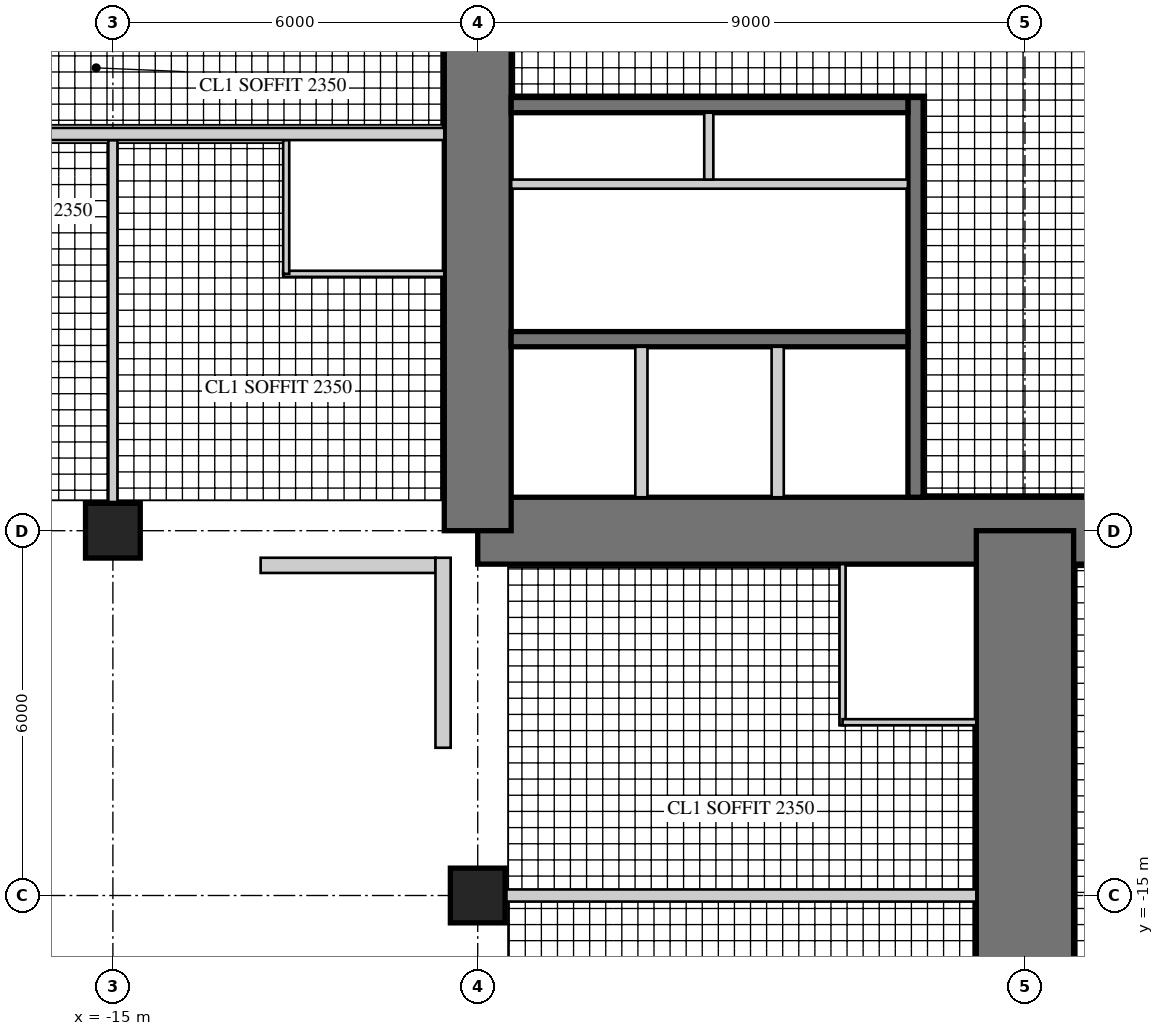
"""IFC4 building model, lengths in metres.
Left out: names, types, materials, properties, quantities, classifications, styles, units other than length and angle.
Written with IfcOpenShell. Run it as: python <this file> out.ifc"""

import sys

from ifc_helpers import new_model, si_unit, direction, frame, frame_2d, origin, origin_2d, place, context, subcontext, project, spatial, rectangle, hollow_rectangle, extrude, element, fill, save


model = new_model("IFC4")
c1 = context("Model", 3, precision=1e-05, world=origin(), true_north=direction((0.0, 1.0)))
c2 = subcontext(c1, "Body", "Model", "MODEL_VIEW")
j1 = project(units=[si_unit("LENGTHUNIT", "METRE"), si_unit("PLANEANGLEUNIT", "RADIAN")], contexts=[c1])
p1 = place(None, origin())
s1 = spatial("IfcSite", under=j1, at=p1, CompositionType="ELEMENT")
p2 = place(p1, origin())
s2 = spatial("IfcBuilding", under=s1, at=p2, CompositionType="ELEMENT")
p3 = place(p2, frame((0.0, 0.0, 200.1)))
s3 = spatial("IfcBuildingStorey", under=s2, at=p3, CompositionType="ELEMENT", Elevation=200.1)
p4 = place(p3, frame((-9.0, -9.0, 0.0), z_axis=(0.0, 0.0, 1.0), x_axis=(1.0, 0.0, 0.0)))
e1 = element("IfcWall", 1, at=p4, inside=s3, PredefinedType="SHEAR", context=c2, shape_type="SweptSolid", body=[
    extrude(rectangle(XDim=18.0, YDim=1.1, at=frame_2d((9.0, 0.0))), origin(), (0.0, 0.0, 1.0), 3.4),
])
p5 = place(p4, frame((9.8, 0.0, 0.0)))
e2 = element("IfcOpeningElement", 2, at=p5, cuts=e1, PredefinedType="OPENING", context=c2, shape_type="SweptSolid", body=[
    extrude(rectangle(XDim=1.0, YDim=2.4, at=frame_2d((0.5, 1.2))), frame((0.0, 0.56, 0.0), z_axis=(0.0, -1.0, 0.0), x_axis=(1.0, 0.0, 0.0)), (0.0, 0.0, 1.0), 1.12),
])
p6 = place(p3, frame((-9.0, 9.0, 0.0), z_axis=(0.0, 0.0, 1.0), x_axis=(0.0, -1.0, 0.0)))
e3 = element("IfcWall", 3, at=p6, inside=s3, PredefinedType="SHEAR", context=c2, shape_type="SweptSolid", body=[
    extrude(rectangle(XDim=18.0, YDim=1.1, at=frame_2d((9.0, 0.0))), origin(), (0.0, 0.0, 1.0), 3.4),
])
p7 = place(p6, frame((9.8, 0.0, 0.0)))
e4 = element("IfcOpeningElement", 4, at=p7, cuts=e3, PredefinedType="OPENING", context=c2, shape_type="SweptSolid", body=[
    extrude(rectangle(XDim=1.0, YDim=2.4, at=frame_2d((0.5, 1.2))), frame((0.0, 0.56, 0.0), z_axis=(0.0, -1.0, 0.0), x_axis=(1.0, 0.0, 0.0)), (0.0, 0.0, 1.0), 1.12),
])
p8 = place(p3, frame((-1.8, -1.875, 0.0), z_axis=(0.0, 0.0, 1.0), x_axis=(0.0, -1.0, 0.0)))
e5 = element("IfcWall", 5, at=p8, inside=s3, PredefinedType="SHEAR", context=c2, shape_type="SweptSolid", body=[
    extrude(rectangle(XDim=6.575, YDim=0.25, at=frame_2d((3.288, 0.0))), origin(), (0.0, 0.0, 1.0), 3.4),
])
p9 = place(p8, frame((1.875, 0.0, 0.0)))
e6 = element("IfcOpeningElement", 6, at=p9, cuts=e5, PredefinedType="OPENING", context=c2, shape_type="SweptSolid", body=[
    extrude(rectangle(XDim=1.6, YDim=2.4, at=frame_2d((0.8, 1.2))), frame((0.0, 0.135, 0.0), z_axis=(0.0, -1.0, 0.0), x_axis=(1.0, 0.0, 0.0)), (0.0, 0.0, 1.0), 0.27),
])
p10 = place(p3, frame((-1.925, -2.0, 0.0), z_axis=(0.0, 0.0, 1.0), x_axis=(-1.0, 0.0, 0.0)))
e7 = element("IfcWall", 7, at=p10, inside=s3, PredefinedType="SHEAR", context=c2, shape_type="SweptSolid", body=[
    extrude(rectangle(XDim=6.525, YDim=0.25, at=frame_2d((3.262, 0.0))), origin(), (0.0, 0.0, 1.0), 3.4),
])
p11 = place(p3, frame((-1.925, -5.85, 0.0), z_axis=(0.0, 0.0, 1.0), x_axis=(-1.0, 0.0, 0.0)))
e8 = element("IfcWall", 8, at=p11, inside=s3, PredefinedType="SHEAR", context=c2, shape_type="SweptSolid", body=[
    extrude(rectangle(XDim=6.525, YDim=0.25, at=frame_2d((3.262, 0.0))), origin(), (0.0, 0.0, 1.0), 3.4),
])
p12 = place(p11, frame((0.471, 0.0, 0.0)))
e9 = element("IfcOpeningElement", 9, at=p12, cuts=e8, PredefinedType="OPENING", context=c2, shape_type="SweptSolid", body=[
    extrude(rectangle(XDim=1.1, YDim=2.2, at=frame_2d((0.55, 1.1))), frame((0.0, 0.135, 0.0), z_axis=(0.0, -1.0, 0.0), x_axis=(1.0, 0.0, 0.0)), (0.0, 0.0, 1.0), 0.27),
])
p13 = place(p11, frame((2.712, 0.0, 0.0)))
e10 = element("IfcOpeningElement", 10, at=p13, cuts=e8, PredefinedType="OPENING", context=c2, shape_type="SweptSolid", body=[
    extrude(rectangle(XDim=1.1, YDim=2.2, at=frame_2d((0.55, 1.1))), frame((0.0, 0.135, 0.0), z_axis=(0.0, -1.0, 0.0), x_axis=(1.0, 0.0, 0.0)), (0.0, 0.0, 1.0), 0.27),
])
p14 = place(p11, frame((4.954, 0.0, 0.0)))
e11 = element("IfcOpeningElement", 11, at=p14, cuts=e8, PredefinedType="OPENING", context=c2, shape_type="SweptSolid", body=[
    extrude(rectangle(XDim=1.1, YDim=2.2, at=frame_2d((0.55, 1.1))), frame((0.0, 0.135, 0.0), z_axis=(0.0, -1.0, 0.0), x_axis=(1.0, 0.0, 0.0)), (0.0, 0.0, 1.0), 0.27),
])
p15 = place(p3, frame((-1.925, -3.3, 0.0), z_axis=(0.0, 0.0, 1.0), x_axis=(-1.0, 0.0, 0.0)))
e12 = element("IfcWall", 12, at=p15, inside=s3, PredefinedType="PARTITIONING", context=c2, shape_type="SweptSolid", body=[
    extrude(rectangle(XDim=6.525, YDim=0.15, at=frame_2d((3.262, 0.0))), origin(), (0.0, 0.0, 1.0), 3.4),
])
p16 = place(p15, frame((0.075, 0.0, 0.0)))
e13 = element("IfcOpeningElement", 13, at=p16, cuts=e12, PredefinedType="OPENING", context=c2, shape_type="SweptSolid", body=[
    extrude(rectangle(XDim=0.8, YDim=2.1, at=frame_2d((0.4, 1.05))), frame((0.0, 0.085, 0.0), z_axis=(0.0, -1.0, 0.0), x_axis=(1.0, 0.0, 0.0)), (0.0, 0.0, 1.0), 0.17),
])
p17 = place(p15, frame((3.675, 0.0, 0.0)))
e14 = element("IfcOpeningElement", 14, at=p17, cuts=e12, PredefinedType="OPENING", context=c2, shape_type="SweptSolid", body=[
    extrude(rectangle(XDim=0.8, YDim=2.1, at=frame_2d((0.4, 1.05))), frame((0.0, 0.085, 0.0), z_axis=(0.0, -1.0, 0.0), x_axis=(1.0, 0.0, 0.0)), (0.0, 0.0, 1.0), 0.17),
])
p18 = place(p3, frame((-5.2, -2.125, 0.0), z_axis=(0.0, 0.0, 1.0), x_axis=(0.0, -1.0, 0.0)))
e15 = element("IfcWall", 15, at=p18, inside=s3, PredefinedType="PARTITIONING", context=c2, shape_type="SweptSolid", body=[
    extrude(rectangle(XDim=1.1, YDim=0.15, at=frame_2d((0.55, 0.0))), origin(), (0.0, 0.0, 1.0), 3.4),
])
for number, where, z_axis, x_axis in (
    (16, (-4.067, -5.975, 0.0), (0.0, 0.0, 1.0), (0.0, -1.0, 0.0)),
    (17, (-6.308, -5.975, 0.0), (0.0, 0.0, 1.0), (0.0, -1.0, 0.0)),
):
    element("IfcWall", number, at=place(p3, frame(where, z_axis=z_axis, x_axis=x_axis)), inside=s3, PredefinedType="PARTITIONING", context=c2, shape_type="SweptSolid", body=[
        extrude(rectangle(XDim=2.475, YDim=0.2, at=frame_2d((1.237, 0.0))), origin(), (0.0, 0.0, 1.0), 3.4),
    ])
p19 = place(p3, frame((0.0, -9.0, 0.0), z_axis=(0.0, 0.0, 1.0), x_axis=(0.0, -1.0, 0.0)))
e18 = element("IfcWall", 18, at=p19, inside=s3, PredefinedType="SHEAR", context=c2, shape_type="SweptSolid", body=[
    extrude(rectangle(XDim=18.0, YDim=1.6, at=frame_2d((9.0, 0.0))), origin(), (0.0, 0.0, 1.0), 3.4),
])
p20 = place(p19, frame((3.95, 0.0, 0.0)))
e19 = element("IfcOpeningElement", 19, at=p20, cuts=e18, PredefinedType="OPENING", context=c2, shape_type="SweptSolid", body=[
    extrude(rectangle(XDim=1.0, YDim=2.15, at=frame_2d((0.5, 1.075))), frame((0.0, 0.81, 0.0), z_axis=(0.0, -1.0, 0.0), x_axis=(1.0, 0.0, 0.0)), (0.0, 0.0, 1.0), 1.62),
])
p21 = place(p19, frame((6.6, 0.0, 0.0)))
e20 = element("IfcOpeningElement", 20, at=p21, cuts=e18, PredefinedType="OPENING", context=c2, shape_type="SweptSolid", body=[
    extrude(rectangle(XDim=1.0, YDim=2.15, at=frame_2d((0.5, 1.075))), frame((0.0, 0.81, 0.0), z_axis=(0.0, -1.0, 0.0), x_axis=(1.0, 0.0, 0.0)), (0.0, 0.0, 1.0), 1.62),
])
p22 = place(p19, frame((13.25, 0.0, 0.0)))
e21 = element("IfcOpeningElement", 21, at=p22, cuts=e18, PredefinedType="OPENING", context=c2, shape_type="SweptSolid", body=[
    extrude(rectangle(XDim=1.0, YDim=2.2, at=frame_2d((0.5, 1.1))), frame((0.0, 0.81, 0.0), z_axis=(0.0, -1.0, 0.0), x_axis=(1.0, 0.0, 0.0)), (0.0, 0.0, 1.0), 1.62),
])
for number, where, z_axis, x_axis in (
    (22, (-9.0, -15.0, 0.0), (0.0, 0.0, 1.0), (1.0, 0.0, 0.0)),
    (23, (-15.0, -9.0, 0.0), (0.0, 0.0, 1.0), (1.0, 0.0, 0.0)),
):
    element("IfcColumn", number, at=place(p3, frame(where, z_axis=z_axis, x_axis=x_axis)), inside=s3, PredefinedType="COLUMN", context=c2, shape_type="SweptSolid", body=[
        extrude(rectangle(XDim=0.9, YDim=0.9, at=origin_2d()), origin(), (0.0, 0.0, 1.0), 3.4),
    ])
p23 = place(p3, frame((-12.57, -9.57, 0.0), z_axis=(0.0, 0.0, 1.0), x_axis=(1.0, 0.0, 0.0)))
e24 = element("IfcWall", 24, at=p23, inside=s3, PredefinedType="SOLIDWALL", context=c2, shape_type="SweptSolid", body=[
    extrude(rectangle(XDim=2.875, YDim=0.25, at=frame_2d((1.438, 0.0))), origin(), (0.0, 0.0, 1.0), 3.22),
])
p24 = place(p23, frame((0.6, 0.0, 0.0)))
e25 = element("IfcOpeningElement", 25, at=p24, cuts=e24, PredefinedType="OPENING", context=c2, shape_type="SweptSolid", body=[
    extrude(rectangle(XDim=1.0, YDim=2.2, at=frame_2d((0.5, 1.1))), frame((0.0, 0.135, 0.0), z_axis=(0.0, -1.0, 0.0), x_axis=(1.0, 0.0, 0.0)), (0.0, 0.0, 1.0), 0.27),
])
p25 = place(p3, frame((-9.57, -9.445, 0.0), z_axis=(0.0, 0.0, 1.0), x_axis=(0.0, -1.0, 0.0)))
e26 = element("IfcWall", 26, at=p25, inside=s3, PredefinedType="SOLIDWALL", context=c2, shape_type="SweptSolid", body=[
    extrude(rectangle(XDim=3.125, YDim=0.25, at=frame_2d((1.562, 0.0))), origin(), (0.0, 0.0, 1.0), 3.22),
])
p26 = place(p25, frame((0.6, 0.0, 0.0)))
e27 = element("IfcOpeningElement", 27, at=p26, cuts=e26, PredefinedType="OPENING", context=c2, shape_type="SweptSolid", body=[
    extrude(rectangle(XDim=1.0, YDim=2.2, at=frame_2d((0.5, 1.1))), frame((0.0, 0.135, 0.0), z_axis=(0.0, -1.0, 0.0), x_axis=(1.0, 0.0, 0.0)), (0.0, 0.0, 1.0), 0.27),
])
p27 = place(p3, frame((-3.0, -9.55, 0.0), z_axis=(0.0, 0.0, 1.0), x_axis=(0.0, -1.0, 0.0)))
e28 = element("IfcWall", 28, at=p27, inside=s3, PredefinedType="PARTITIONING", context=c2, shape_type="SweptSolid", body=[
    extrude(rectangle(XDim=2.65, YDim=0.1, at=frame_2d((1.325, 0.0))), origin(), (0.0, 0.0, 1.0), 3.22),
])
p28 = place(p3, frame((-3.0, -12.15, 0.0), z_axis=(0.0, 0.0, 1.0), x_axis=(1.0, 0.0, 0.0)))
e29 = element("IfcWall", 29, at=p28, inside=s3, PredefinedType="PARTITIONING", context=c2, shape_type="SweptSolid", body=[
    extrude(rectangle(XDim=2.2, YDim=0.1, at=frame_2d((1.1, 0.0))), origin(), (0.0, 0.0, 1.0), 3.22),
])
p29 = place(p28, frame((0.55, 0.0, 0.0)))
e30 = element("IfcOpeningElement", 30, at=p29, cuts=e29, PredefinedType="OPENING", context=c2, shape_type="SweptSolid", body=[
    extrude(rectangle(XDim=0.9, YDim=2.1, at=frame_2d((0.45, 1.05))), frame((0.0, 0.06, 0.0), z_axis=(0.0, -1.0, 0.0), x_axis=(1.0, 0.0, 0.0)), (0.0, 0.0, 1.0), 0.12),
])
p30 = place(p3, frame((-8.55, -15.0, 0.0), z_axis=(0.0, 0.0, 1.0), x_axis=(1.0, 0.0, 0.0)))
e31 = element("IfcWall", 31, at=p30, inside=s3, PredefinedType="SOLIDWALL", context=c2, shape_type="SweptSolid", body=[
    extrude(rectangle(XDim=7.75, YDim=0.2, at=frame_2d((3.875, 0.0))), origin(), (0.0, 0.0, 1.0), 2.47),
])
p31 = place(p3, frame((-9.55, -4.775, 0.0), z_axis=(0.0, 0.0, 1.0), x_axis=(-1.0, 0.0, 0.0)))
e32 = element("IfcWall", 32, at=p31, inside=s3, PredefinedType="PARTITIONING", context=c2, shape_type="SweptSolid", body=[
    extrude(rectangle(XDim=2.65, YDim=0.1, at=frame_2d((1.325, 0.0))), origin(), (0.0, 0.0, 1.0), 3.22),
])
p32 = place(p3, frame((-12.15, -2.575, 0.0), z_axis=(0.0, 0.0, 1.0), x_axis=(0.0, -1.0, 0.0)))
e33 = element("IfcWall", 33, at=p32, inside=s3, PredefinedType="PARTITIONING", context=c2, shape_type="SweptSolid", body=[
    extrude(rectangle(XDim=2.2, YDim=0.1, at=frame_2d((1.1, 0.0))), origin(), (0.0, 0.0, 1.0), 3.22),
])
p33 = place(p32, frame((0.55, 0.0, 0.0)))
e34 = element("IfcOpeningElement", 34, at=p33, cuts=e33, PredefinedType="OPENING", context=c2, shape_type="SweptSolid", body=[
    extrude(rectangle(XDim=0.9, YDim=2.1, at=frame_2d((0.45, 1.05))), frame((0.0, 0.06, 0.0), z_axis=(0.0, -1.0, 0.0), x_axis=(1.0, 0.0, 0.0)), (0.0, 0.0, 1.0), 0.12),
])
p34 = place(p3, frame((-15.0, -2.575, 0.0), z_axis=(0.0, 0.0, 1.0), x_axis=(0.0, -1.0, 0.0)))
e35 = element("IfcWall", 35, at=p34, inside=s3, PredefinedType="PARTITIONING", context=c2, shape_type="SweptSolid", body=[
    extrude(rectangle(XDim=5.975, YDim=0.15, at=frame_2d((2.988, 0.0))), origin(), (0.0, 0.0, 1.0), 2.47),
])
p35 = place(p34, frame((0.5, 0.0, 0.0)))
e36 = element("IfcOpeningElement", 36, at=p35, cuts=e35, PredefinedType="OPENING", context=c2, shape_type="SweptSolid", body=[
    extrude(rectangle(XDim=1.0, YDim=2.1, at=frame_2d((0.5, 1.05))), frame((0.0, 0.085, 0.0), z_axis=(0.0, -1.0, 0.0), x_axis=(1.0, 0.0, 0.0)), (0.0, 0.0, 1.0), 0.17),
])
p36 = place(p3, frame((-9.55, -2.475, 0.0), z_axis=(0.0, 0.0, 1.0), x_axis=(-1.0, 0.0, 0.0)))
e37 = element("IfcWall", 37, at=p36, inside=s3, PredefinedType="SOLIDWALL", context=c2, shape_type="SweptSolid", body=[
    extrude(rectangle(XDim=11.45, YDim=0.2, at=frame_2d((5.725, 0.0))), origin(), (0.0, 0.0, 1.0), 3.22),
])
p37 = place(p36, frame((3.4, 0.0, 0.0)))
e38 = element("IfcOpeningElement", 38, at=p37, cuts=e37, PredefinedType="OPENING", context=c2, shape_type="SweptSolid", body=[
    extrude(rectangle(XDim=1.0, YDim=2.15, at=frame_2d((0.5, 1.075))), frame((0.0, 0.11, 0.0), z_axis=(0.0, -1.0, 0.0), x_axis=(1.0, 0.0, 0.0)), (0.0, 0.0, 1.0), 0.22),
])
p38 = place(p24, origin())
e39 = element("IfcDoor", 39, at=p38, inside=s3, OperationType="SINGLE_SWING_RIGHT", PredefinedType="DOOR", context=c2, shape_type="SweptSolid", body=[
    extrude(hollow_rectangle(XDim=1.0, YDim=2.2, WallThickness=0.06, at=frame_2d((0.5, 1.1))), frame((0.0, 0.025, 0.0), z_axis=(0.0, -1.0, 0.0), x_axis=(1.0, 0.0, 0.0)), (0.0, 0.0, 1.0), 0.05),
    extrude(rectangle(XDim=0.879, YDim=2.079, at=frame_2d((0.5, 1.1))), frame((0.0, 0.025, 0.0), z_axis=(0.0, -1.0, 0.0), x_axis=(1.0, 0.0, 0.0)), (0.0, 0.0, 1.0), 0.05),
])
fill(e25, e39)
p39 = place(p26, origin())
e40 = element("IfcDoor", 40, at=p39, inside=s3, OperationType="SINGLE_SWING_LEFT", PredefinedType="DOOR", context=c2, shape_type="SweptSolid", body=[
    extrude(hollow_rectangle(XDim=1.0, YDim=2.2, WallThickness=0.06, at=frame_2d((0.5, 1.1))), frame((0.0, 0.025, 0.0), z_axis=(0.0, -1.0, 0.0), x_axis=(1.0, 0.0, 0.0)), (0.0, 0.0, 1.0), 0.05),
    extrude(rectangle(XDim=0.879, YDim=2.079, at=frame_2d((0.5, 1.1))), frame((0.0, 0.025, 0.0), z_axis=(0.0, -1.0, 0.0), x_axis=(1.0, 0.0, 0.0)), (0.0, 0.0, 1.0), 0.05),
])
fill(e27, e40)
p40 = place(p29, origin())
e41 = element("IfcDoor", 41, at=p40, inside=s3, OperationType="SINGLE_SWING_LEFT", PredefinedType="DOOR", context=c2, shape_type="SweptSolid", body=[
    extrude(rectangle(XDim=0.9, YDim=2.1, at=frame_2d((0.45, 1.05))), frame((0.0, 0.025, 0.0), z_axis=(0.0, -1.0, 0.0), x_axis=(1.0, 0.0, 0.0)), (0.0, 0.0, 1.0), 0.05),
])
fill(e30, e41)
p41 = place(p33, origin())
e42 = element("IfcDoor", 42, at=p41, inside=s3, OperationType="SINGLE_SWING_LEFT", PredefinedType="DOOR", context=c2, shape_type="SweptSolid", body=[
    extrude(rectangle(XDim=0.9, YDim=2.1, at=frame_2d((0.45, 1.05))), frame((0.0, 0.025, 0.0), z_axis=(0.0, -1.0, 0.0), x_axis=(1.0, 0.0, 0.0)), (0.0, 0.0, 1.0), 0.05),
])
fill(e34, e42)
p42 = place(p35, origin())
e43 = element("IfcDoor", 43, at=p42, inside=s3, OperationType="SINGLE_SWING_LEFT", PredefinedType="DOOR", context=c2, shape_type="SweptSolid", body=[
    extrude(rectangle(XDim=1.0, YDim=2.1, at=frame_2d((0.5, 1.05))), frame((0.0, 0.025, 0.0), z_axis=(0.0, -1.0, 0.0), x_axis=(1.0, 0.0, 0.0)), (0.0, 0.0, 1.0), 0.05),
])
fill(e36, e43)
p43 = place(p37, origin())
e44 = element("IfcDoor", 44, at=p43, inside=s3, OperationType="SINGLE_SWING_LEFT", PredefinedType="DOOR", context=c2, shape_type="SweptSolid", body=[
    extrude(rectangle(XDim=1.0, YDim=2.15, at=frame_2d((0.5, 1.075))), frame((0.0, 0.025, 0.0), z_axis=(0.0, -1.0, 0.0), x_axis=(1.0, 0.0, 0.0)), (0.0, 0.0, 1.0), 0.05),
])
fill(e38, e44)
p44 = place(p20, frame((1.0, 0.0, 0.0), z_axis=(0.0, 0.0, 1.0), x_axis=(-1.0, 0.0, 0.0)))
e45 = element("IfcDoor", 45, at=p44, inside=s3, OperationType="SINGLE_SWING_RIGHT", PredefinedType="DOOR", context=c2, shape_type="SweptSolid", body=[
    extrude(rectangle(XDim=1.0, YDim=2.15, at=frame_2d((0.5, 1.075))), frame((0.0, 0.025, 0.0), z_axis=(0.0, -1.0, 0.0), x_axis=(1.0, 0.0, 0.0)), (0.0, 0.0, 1.0), 0.05),
])
fill(e19, e45)
p45 = place(p21, frame((1.0, 0.0, 0.0), z_axis=(0.0, 0.0, 1.0), x_axis=(-1.0, 0.0, 0.0)))
e46 = element("IfcDoor", 46, at=p45, inside=s3, OperationType="SINGLE_SWING_RIGHT", PredefinedType="DOOR", context=c2, shape_type="SweptSolid", body=[
    extrude(rectangle(XDim=1.0, YDim=2.15, at=frame_2d((0.5, 1.075))), frame((0.0, 0.025, 0.0), z_axis=(0.0, -1.0, 0.0), x_axis=(1.0, 0.0, 0.0)), (0.0, 0.0, 1.0), 0.05),
])
fill(e20, e46)
p46 = place(p5, origin())
e47 = element("IfcDoor", 47, at=p46, inside=s3, OperationType="SINGLE_SWING_RIGHT", PredefinedType="DOOR", context=c2, shape_type="SweptSolid", body=[
    extrude(rectangle(XDim=1.0, YDim=2.4, at=frame_2d((0.5, 1.2))), frame((0.0, 0.055, 0.0), z_axis=(0.0, -1.0, 0.0), x_axis=(1.0, 0.0, 0.0)), (0.0, 0.0, 1.0), 0.05),
])
fill(e2, e47)
p47 = place(p7, origin())
e48 = element("IfcDoor", 48, at=p47, inside=s3, OperationType="SINGLE_SWING_RIGHT", PredefinedType="DOOR", context=c2, shape_type="SweptSolid", body=[
    extrude(rectangle(XDim=1.0, YDim=2.4, at=frame_2d((0.5, 1.2))), frame((0.0, 0.055, 0.0), z_axis=(0.0, -1.0, 0.0), x_axis=(1.0, 0.0, 0.0)), (0.0, 0.0, 1.0), 0.05),
])
fill(e4, e48)
p48 = place(p12, origin())
e49 = element("IfcDoor", 49, at=p48, inside=s3, OperationType="DOUBLE_DOOR_SLIDING", PredefinedType="DOOR", context=c2, shape_type="SweptSolid", body=[
    extrude(rectangle(XDim=1.1, YDim=2.2, at=frame_2d((0.55, 1.1))), frame((0.0, 0.025, 0.0), z_axis=(0.0, -1.0, 0.0), x_axis=(1.0, 0.0, 0.0)), (0.0, 0.0, 1.0), 0.05),
])
fill(e9, e49)
p49 = place(p13, origin())
e50 = element("IfcDoor", 50, at=p49, inside=s3, OperationType="DOUBLE_DOOR_SLIDING", PredefinedType="DOOR", context=c2, shape_type="SweptSolid", body=[
    extrude(rectangle(XDim=1.1, YDim=2.2, at=frame_2d((0.55, 1.1))), frame((0.0, 0.025, 0.0), z_axis=(0.0, -1.0, 0.0), x_axis=(1.0, 0.0, 0.0)), (0.0, 0.0, 1.0), 0.05),
])
fill(e10, e50)
p50 = place(p14, origin())
e51 = element("IfcDoor", 51, at=p50, inside=s3, OperationType="DOUBLE_DOOR_SLIDING", PredefinedType="DOOR", context=c2, shape_type="SweptSolid", body=[
    extrude(rectangle(XDim=1.1, YDim=2.2, at=frame_2d((0.55, 1.1))), frame((0.0, 0.025, 0.0), z_axis=(0.0, -1.0, 0.0), x_axis=(1.0, 0.0, 0.0)), (0.0, 0.0, 1.0), 0.05),
])
fill(e11, e51)
p51 = place(p9, origin())
e52 = element("IfcDoor", 52, at=p51, inside=s3, OperationType="DOUBLE_DOOR_DOUBLE_SWING", PredefinedType="DOOR", context=c2, shape_type="SweptSolid", body=[
    extrude(rectangle(XDim=1.6, YDim=2.4, at=frame_2d((0.8, 1.2))), frame((0.0, 0.025, 0.0), z_axis=(0.0, -1.0, 0.0), x_axis=(1.0, 0.0, 0.0)), (0.0, 0.0, 1.0), 0.05),
])
fill(e6, e52)
p52 = place(p16, frame((0.8, 0.0, 0.0), z_axis=(0.0, 0.0, 1.0), x_axis=(-1.0, 0.0, 0.0)))
e53 = element("IfcDoor", 53, at=p52, inside=s3, OperationType="SINGLE_SWING_RIGHT", PredefinedType="DOOR", context=c2, shape_type="SweptSolid", body=[
    extrude(rectangle(XDim=0.8, YDim=2.1, at=frame_2d((0.4, 1.05))), frame((0.0, 0.025, 0.0), z_axis=(0.0, -1.0, 0.0), x_axis=(1.0, 0.0, 0.0)), (0.0, 0.0, 1.0), 0.05),
])
fill(e13, e53)
p53 = place(p17, frame((0.8, 0.0, 0.0), z_axis=(0.0, 0.0, 1.0), x_axis=(-1.0, 0.0, 0.0)))
e54 = element("IfcDoor", 54, at=p53, inside=s3, OperationType="SINGLE_SWING_RIGHT", PredefinedType="DOOR", context=c2, shape_type="SweptSolid", body=[
    extrude(rectangle(XDim=0.8, YDim=2.1, at=frame_2d((0.4, 1.05))), frame((0.0, 0.025, 0.0), z_axis=(0.0, -1.0, 0.0), x_axis=(1.0, 0.0, 0.0)), (0.0, 0.0, 1.0), 0.05),
])
fill(e14, e54)
save(model, sys.argv[1])
